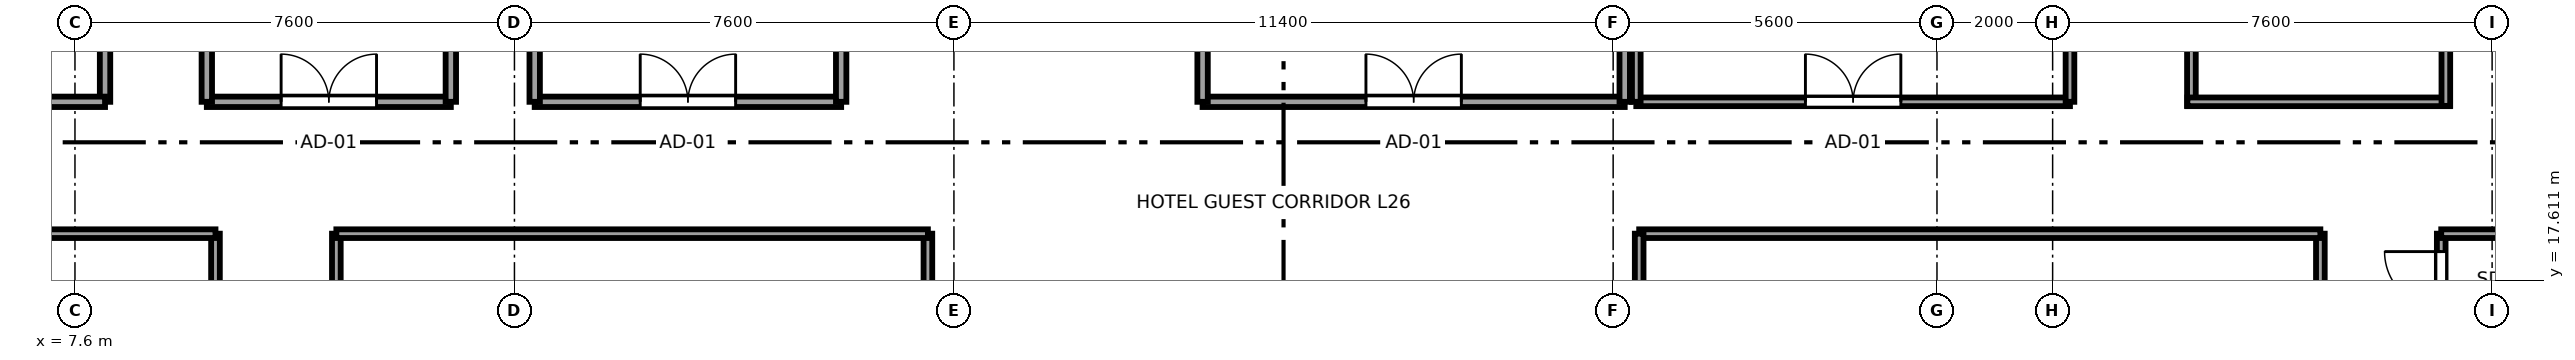
"""IFC4 building model, lengths in metres.
Left out: names, types, materials, properties, quantities, classifications, styles, units other than length and angle.
Written with IfcOpenShell. Run it as: python <this file> out.ifc"""

import sys

from ifc_helpers import new_model, si_unit, direction, frame, frame_2d, origin, place, context, subcontext, project, spatial, rectangle, extrude, source, transform, mapped, element, fill, save


model = new_model("IFC4")
c1 = context("Model", 3, precision=1e-05, world=origin(), true_north=direction((0.0, 1.0)))
c2 = subcontext(c1, "Body", "Model", "MODEL_VIEW")
j1 = project(units=[si_unit("LENGTHUNIT", "METRE"), si_unit("PLANEANGLEUNIT", "RADIAN")], contexts=[c1])
p1 = place(None, origin())
s1 = spatial("IfcSite", under=j1, at=p1, CompositionType="ELEMENT")
p2 = place(p1, origin())
s2 = spatial("IfcBuilding", under=s1, at=p2, CompositionType="ELEMENT")
p3 = place(p2, frame((0.0, 0.0, 104.45)))
s3 = spatial("IfcBuildingStorey", under=s2, at=p3, CompositionType="ELEMENT", Elevation=104.45)
p4 = place(p3, frame((10.03, 11.61, 0.0), z_axis=(0.0, 0.0, 1.0), x_axis=(0.0, 1.0, 0.0)))
e1 = element("IfcWall", 1, at=p4, inside=s3, PredefinedType="PARTITIONING", context=c2, shape_type="SweptSolid", body=[
    extrude(rectangle(XDim=6.81, YDim=0.15, at=frame_2d((3.405, 0.0))), origin(), (0.0, 0.0, 1.0), 3.37),
])
p5 = place(p4, frame((2.895, 0.0, 0.0)))
e2 = element("IfcOpeningElement", 2, at=p5, cuts=e1, PredefinedType="OPENING", context=c2, shape_type="SweptSolid", body=[
    extrude(rectangle(XDim=0.98, YDim=2.12, at=frame_2d((0.49, 1.06))), frame((0.0, 0.085, 0.0), z_axis=(0.0, -1.0, 0.0), x_axis=(1.0, 0.0, 0.0)), (0.0, 0.0, 1.0), 0.17),
])
p6 = place(p3, frame((0.3, 18.42, 0.0), z_axis=(0.0, 0.0, 1.0), x_axis=(1.0, 0.0, 0.0)))
e3 = element("IfcWall", 3, at=p6, inside=s3, PredefinedType="PARTITIONING", context=c2, shape_type="SweptSolid", body=[
    extrude(rectangle(XDim=9.73, YDim=0.15, at=frame_2d((4.865, 0.0))), origin(), (0.0, 0.0, 1.0), 3.37),
])
p7 = place(p3, frame((12.12, 14.81, 0.0), z_axis=(0.0, 0.0, 1.0), x_axis=(0.0, 1.0, 0.0)))
e4 = element("IfcWall", 4, at=p7, inside=s3, PredefinedType="PARTITIONING", context=c2, shape_type="SweptSolid", body=[
    extrude(rectangle(XDim=3.61, YDim=0.15, at=frame_2d((1.805, 0.0))), origin(), (0.0, 0.0, 1.0), 3.37),
])
p8 = place(p7, frame((1.295, 0.0, 0.0)))
e5 = element("IfcOpeningElement", 5, at=p8, cuts=e4, PredefinedType="OPENING", context=c2, shape_type="SweptSolid", body=[
    extrude(rectangle(XDim=0.98, YDim=2.12, at=frame_2d((0.49, 1.06))), frame((0.0, 0.085, 0.0), z_axis=(0.0, -1.0, 0.0), x_axis=(1.0, 0.0, 0.0)), (0.0, 0.0, 1.0), 0.17),
])
p9 = place(p3, frame((22.35, 12.48, 0.0), z_axis=(0.0, 0.0, 1.0), x_axis=(0.0, 1.0, 0.0)))
e6 = element("IfcWall", 6, at=p9, inside=s3, PredefinedType="PARTITIONING", context=c2, shape_type="SweptSolid", body=[
    extrude(rectangle(XDim=5.94, YDim=0.15, at=frame_2d((2.97, 0.0))), origin(), (0.0, 0.0, 1.0), 3.37),
])
p10 = place(p3, frame((12.12, 18.42, 0.0), z_axis=(0.0, 0.0, 1.0), x_axis=(1.0, 0.0, 0.0)))
e7 = element("IfcWall", 7, at=p10, inside=s3, PredefinedType="PARTITIONING", context=c2, shape_type="SweptSolid", body=[
    extrude(rectangle(XDim=10.23, YDim=0.15, at=frame_2d((5.115, 0.0))), origin(), (0.0, 0.0, 1.0), 3.37),
])
p11 = place(p3, frame((46.43, 11.41, 0.0), z_axis=(0.0, 0.0, 1.0), x_axis=(0.0, 1.0, 0.0)))
e8 = element("IfcWall", 8, at=p11, inside=s3, PredefinedType="PARTITIONING", context=c2, shape_type="SweptSolid", body=[
    extrude(rectangle(XDim=7.01, YDim=0.15, at=frame_2d((3.505, 0.0))), origin(), (0.0, 0.0, 1.0), 3.37),
])
p12 = place(p11, frame((2.995, 0.0, 0.0)))
e9 = element("IfcOpeningElement", 9, at=p12, cuts=e8, PredefinedType="OPENING", context=c2, shape_type="SweptSolid", body=[
    extrude(rectangle(XDim=0.98, YDim=2.12, at=frame_2d((0.49, 1.06))), frame((0.0, 0.085, 0.0), z_axis=(0.0, -1.0, 0.0), x_axis=(1.0, 0.0, 0.0)), (0.0, 0.0, 1.0), 0.17),
])
p13 = place(p3, frame((34.65, 18.42, 0.0), z_axis=(0.0, 0.0, 1.0), x_axis=(1.0, 0.0, 0.0)))
e10 = element("IfcWall", 10, at=p13, inside=s3, PredefinedType="PARTITIONING", context=c2, shape_type="SweptSolid", body=[
    extrude(rectangle(XDim=11.78, YDim=0.15, at=frame_2d((5.89, 0.0))), origin(), (0.0, 0.0, 1.0), 3.37),
])
p14 = place(p3, frame((34.65, 9.08, 0.0), z_axis=(0.0, 0.0, 1.0), x_axis=(0.0, 1.0, 0.0)))
e11 = element("IfcWall", 11, at=p14, inside=s3, PredefinedType="PARTITIONING", context=c2, shape_type="SweptSolid", body=[
    extrude(rectangle(XDim=9.34, YDim=0.15, at=frame_2d((4.67, 0.0))), origin(), (0.0, 0.0, 1.0), 3.37),
])
p15 = place(p3, frame((48.52, 14.61, 0.0), z_axis=(0.0, 0.0, 1.0), x_axis=(0.0, 1.0, 0.0)))
e12 = element("IfcWall", 12, at=p15, inside=s3, PredefinedType="PARTITIONING", context=c2, shape_type="SweptSolid", body=[
    extrude(rectangle(XDim=3.81, YDim=0.15, at=frame_2d((1.905, 0.0))), origin(), (0.0, 0.0, 1.0), 3.37),
])
p16 = place(p15, frame((2.52, 0.0, 0.0)))
e13 = element("IfcOpeningElement", 13, at=p16, cuts=e12, PredefinedType="OPENING", context=c2, shape_type="SweptSolid", body=[
    extrude(rectangle(XDim=0.98, YDim=2.12, at=frame_2d((0.49, 1.06))), frame((0.0, 0.085, 0.0), z_axis=(0.0, -1.0, 0.0), x_axis=(1.0, 0.0, 0.0)), (0.0, 0.0, 1.0), 0.17),
])
p17 = place(p3, frame((48.52, 18.42, 0.0), z_axis=(0.0, 0.0, 1.0), x_axis=(1.0, 0.0, 0.0)))
e14 = element("IfcWall", 14, at=p17, inside=s3, PredefinedType="PARTITIONING", context=c2, shape_type="SweptSolid", body=[
    extrude(rectangle(XDim=8.075, YDim=0.15, at=frame_2d((4.038, 0.0))), origin(), (0.0, 0.0, 1.0), 3.37),
])
p18 = place(p3, frame((8.12, 20.7, 0.0), z_axis=(0.0, 0.0, 1.0), x_axis=(0.0, 1.0, 0.0)))
e15 = element("IfcWall", 15, at=p18, inside=s3, PredefinedType="PARTITIONING", context=c2, shape_type="SweptSolid", body=[
    extrude(rectangle(XDim=15.1, YDim=0.18, at=frame_2d((7.55, 0.0))), origin(), (0.0, 0.0, 1.0), 3.37),
])
p19 = place(p18, frame((5.15, 0.0, 0.0)))
e16 = element("IfcOpeningElement", 16, at=p19, cuts=e15, PredefinedType="OPENING", context=c2, shape_type="SweptSolid", body=[
    extrude(rectangle(XDim=1.65, YDim=2.15, at=frame_2d((0.825, 1.075))), frame((0.0, 0.1, 0.0), z_axis=(0.0, -1.0, 0.0), x_axis=(1.0, 0.0, 0.0)), (0.0, 0.0, 1.0), 0.2),
])
p20 = place(p3, frame((0.3, 20.7, 0.0), z_axis=(0.0, 0.0, 1.0), x_axis=(1.0, 0.0, 0.0)))
e17 = element("IfcWall", 17, at=p20, inside=s3, PredefinedType="PARTITIONING", context=c2, shape_type="SweptSolid", body=[
    extrude(rectangle(XDim=7.82, YDim=0.18, at=frame_2d((3.91, 0.0))), origin(), (0.0, 0.0, 1.0), 3.37),
])
p21 = place(p3, frame((44.2, 20.63, 0.0), z_axis=(0.0, 0.0, 1.0), x_axis=(0.0, 1.0, 0.0)))
e18 = element("IfcWall", 18, at=p21, inside=s3, PredefinedType="PARTITIONING", context=c2, shape_type="SweptSolid", body=[
    extrude(rectangle(XDim=3.74, YDim=0.15, at=frame_2d((1.87, 0.0))), origin(), (0.0, 0.0, 1.0), 3.37),
])
p22 = place(p21, frame((1.24, 0.0, 0.0)))
e19 = element("IfcOpeningElement", 19, at=p22, cuts=e18, PredefinedType="OPENING", context=c2, shape_type="SweptSolid", body=[
    extrude(rectangle(XDim=0.92, YDim=2.01, at=frame_2d((0.46, 1.005))), frame((0.0, 0.085, 0.0), z_axis=(0.0, -1.0, 0.0), x_axis=(1.0, 0.0, 0.0)), (0.0, 0.0, 1.0), 0.17),
])
p23 = place(p3, frame((44.13, 20.7, 0.0), z_axis=(0.0, 0.0, 1.0), x_axis=(1.0, 0.0, 0.0)))
e20 = element("IfcWall", 20, at=p23, inside=s3, PredefinedType="PARTITIONING", context=c2, shape_type="SweptSolid", body=[
    extrude(rectangle(XDim=4.54, YDim=0.15, at=frame_2d((2.27, 0.0))), origin(), (0.0, 0.0, 1.0), 3.37),
])
p24 = place(p3, frame((48.6, 20.63, 0.0), z_axis=(0.0, 0.0, 1.0), x_axis=(0.0, 1.0, 0.0)))
e21 = element("IfcWall", 21, at=p24, inside=s3, PredefinedType="PARTITIONING", context=c2, shape_type="SweptSolid", body=[
    extrude(rectangle(XDim=3.74, YDim=0.15, at=frame_2d((1.87, 0.0))), origin(), (0.0, 0.0, 1.0), 3.37),
])
p25 = place(p3, frame((9.88, 20.7, 0.0), z_axis=(0.0, 0.0, 1.0), x_axis=(1.0, 0.0, 0.0)))
e22 = element("IfcWall", 22, at=p25, inside=s3, PredefinedType="PARTITIONING", context=c2, shape_type="SweptSolid", body=[
    extrude(rectangle(XDim=4.22, YDim=0.18, at=frame_2d((2.11, 0.0))), origin(), (0.0, 0.0, 1.0), 3.37),
])
p26 = place(p25, frame((1.285, 0.0, 0.0)))
e23 = element("IfcOpeningElement", 23, at=p26, cuts=e22, PredefinedType="OPENING", context=c2, shape_type="SweptSolid", body=[
    extrude(rectangle(XDim=1.65, YDim=2.15, at=frame_2d((0.825, 1.075))), frame((0.0, 0.1, 0.0), z_axis=(0.0, -1.0, 0.0), x_axis=(1.0, 0.0, 0.0)), (0.0, 0.0, 1.0), 0.2),
])
for number, where, z_axis, x_axis in (
    (24, (9.88, 20.7, 0.0), (0.0, 0.0, 1.0), (0.0, 1.0, 0.0)),
    (25, (14.1, 20.7, 0.0), (0.0, 0.0, 1.0), (0.0, 1.0, 0.0)),
):
    element("IfcWall", number, at=place(p3, frame(where, z_axis=z_axis, x_axis=x_axis)), inside=s3, PredefinedType="PARTITIONING", context=c2, shape_type="SweptSolid", body=[
        extrude(rectangle(XDim=9.05, YDim=0.18, at=frame_2d((4.525, 0.0))), origin(), (0.0, 0.0, 1.0), 3.37),
    ])
p27 = place(p3, frame((27.1, 20.7, 0.0), z_axis=(0.0, 0.0, 1.0), x_axis=(1.0, 0.0, 0.0)))
e26 = element("IfcWall", 26, at=p27, inside=s3, PredefinedType="PARTITIONING", context=c2, shape_type="SweptSolid", body=[
    extrude(rectangle(XDim=7.3, YDim=0.18, at=frame_2d((3.65, 0.0))), origin(), (0.0, 0.0, 1.0), 3.37),
])
p28 = place(p27, frame((2.825, 0.0, 0.0)))
e27 = element("IfcOpeningElement", 27, at=p28, cuts=e26, PredefinedType="OPENING", context=c2, shape_type="SweptSolid", body=[
    extrude(rectangle(XDim=1.65, YDim=2.15, at=frame_2d((0.825, 1.075))), frame((0.0, 0.1, 0.0), z_axis=(0.0, -1.0, 0.0), x_axis=(1.0, 0.0, 0.0)), (0.0, 0.0, 1.0), 0.2),
])
for number, where, z_axis, x_axis in (
    (28, (27.1, 20.7, 0.0), (0.0, 0.0, 1.0), (0.0, 1.0, 0.0)),
    (29, (34.4, 20.7, 0.0), (0.0, 0.0, 1.0), (0.0, 1.0, 0.0)),
):
    element("IfcWall", number, at=place(p3, frame(where, z_axis=z_axis, x_axis=x_axis)), inside=s3, PredefinedType="PARTITIONING", context=c2, shape_type="SweptSolid", body=[
        extrude(rectangle(XDim=9.1, YDim=0.18, at=frame_2d((4.55, 0.0))), origin(), (0.0, 0.0, 1.0), 3.37),
    ])
p29 = place(p3, frame((15.55, 20.7, 0.0), z_axis=(0.0, 0.0, 1.0), x_axis=(1.0, 0.0, 0.0)))
e30 = element("IfcWall", 30, at=p29, inside=s3, PredefinedType="PARTITIONING", context=c2, shape_type="SweptSolid", body=[
    extrude(rectangle(XDim=5.3, YDim=0.18, at=frame_2d((2.65, 0.0))), origin(), (0.0, 0.0, 1.0), 3.37),
])
p30 = place(p29, frame((1.825, 0.0, 0.0)))
e31 = element("IfcOpeningElement", 31, at=p30, cuts=e30, PredefinedType="OPENING", context=c2, shape_type="SweptSolid", body=[
    extrude(rectangle(XDim=1.65, YDim=2.15, at=frame_2d((0.825, 1.075))), frame((0.0, 0.1, 0.0), z_axis=(0.0, -1.0, 0.0), x_axis=(1.0, 0.0, 0.0)), (0.0, 0.0, 1.0), 0.2),
])
for number, where, z_axis, x_axis in (
    (32, (15.55, 20.7, 0.0), (0.0, 0.0, 1.0), (0.0, 1.0, 0.0)),
    (33, (20.85, 20.7, 0.0), (0.0, 0.0, 1.0), (0.0, 1.0, 0.0)),
):
    element("IfcWall", number, at=place(p3, frame(where, z_axis=z_axis, x_axis=x_axis)), inside=s3, PredefinedType="PARTITIONING", context=c2, shape_type="SweptSolid", body=[
        extrude(rectangle(XDim=9.1, YDim=0.18, at=frame_2d((4.55, 0.0))), origin(), (0.0, 0.0, 1.0), 3.37),
    ])
p31 = place(p3, frame((34.6, 20.7, 0.0), z_axis=(0.0, 0.0, 1.0), x_axis=(1.0, 0.0, 0.0)))
e34 = element("IfcWall", 34, at=p31, inside=s3, PredefinedType="PARTITIONING", context=c2, shape_type="SweptSolid", body=[
    extrude(rectangle(XDim=7.5, YDim=0.15, at=frame_2d((3.75, 0.0))), origin(), (0.0, 0.0, 1.0), 3.37),
])
p32 = place(p31, frame((2.925, 0.0, 0.0)))
e35 = element("IfcOpeningElement", 35, at=p32, cuts=e34, PredefinedType="OPENING", context=c2, shape_type="SweptSolid", body=[
    extrude(rectangle(XDim=1.65, YDim=2.15, at=frame_2d((0.825, 1.075))), frame((0.0, 0.085, 0.0), z_axis=(0.0, -1.0, 0.0), x_axis=(1.0, 0.0, 0.0)), (0.0, 0.0, 1.0), 0.17),
])
p33 = place(p3, frame((34.6, 20.7, 0.0), z_axis=(0.0, 0.0, 1.0), x_axis=(0.0, 1.0, 0.0)))
e36 = element("IfcWall", 36, at=p33, inside=s3, PredefinedType="PARTITIONING", context=c2, shape_type="SweptSolid", body=[
    extrude(rectangle(XDim=8.7, YDim=0.15, at=frame_2d((4.35, 0.0))), origin(), (0.0, 0.0, 1.0), 3.37),
])
p34 = place(p3, frame((42.1, 20.7, 0.0), z_axis=(0.0, 0.0, 1.0), x_axis=(0.0, 1.0, 0.0)))
e37 = element("IfcWall", 37, at=p34, inside=s3, PredefinedType="PARTITIONING", context=c2, shape_type="SweptSolid", body=[
    extrude(rectangle(XDim=8.7, YDim=0.15, at=frame_2d((4.35, 0.0))), origin(), (0.0, 0.0, 1.0), 2.16),
])
m1 = source(origin(), c2, "Body", "SweptSolid", [
    extrude(rectangle(XDim=0.98, YDim=2.12, at=frame_2d((0.49, 1.06))), frame((0.0, 0.025, 0.0), z_axis=(0.0, -1.0, 0.0), x_axis=(1.0, 0.0, 0.0)), (0.0, 0.0, 1.0), 0.05),
])
p35 = place(p16, origin())
e38 = element("IfcDoor", 38, at=p35, inside=s3, OperationType="SINGLE_SWING_RIGHT", PredefinedType="DOOR", context=c2, shape_type="MappedRepresentation", body=[
    mapped(m1, transform((0.0, 0.0, 0.0), x_axis=(1.0, 0.0, 0.0), y_axis=(0.0, 1.0, 0.0), z_axis=(0.0, 0.0, 1.0), scale=1.0)),
])
fill(e13, e38)
m2 = source(origin(), c2, "Body", "SweptSolid", [
    extrude(rectangle(XDim=1.65, YDim=2.15, at=frame_2d((0.825, 1.075))), frame((0.0, 0.025, 0.0), z_axis=(0.0, -1.0, 0.0), x_axis=(1.0, 0.0, 0.0)), (0.0, 0.0, 1.0), 0.05),
])
p36 = place(p26, origin())
e39 = element("IfcDoor", 39, at=p36, inside=s3, OperationType="DOUBLE_DOOR_SINGLE_SWING", PredefinedType="DOOR", context=c2, shape_type="MappedRepresentation", body=[
    mapped(m2, transform((0.0, 0.0, 0.0), x_axis=(1.0, 0.0, 0.0), y_axis=(0.0, 1.0, 0.0), z_axis=(0.0, 0.0, 1.0), scale=1.0)),
])
fill(e23, e39)
p37 = place(p28, origin())
e40 = element("IfcDoor", 40, at=p37, inside=s3, OperationType="DOUBLE_DOOR_SINGLE_SWING", PredefinedType="DOOR", context=c2, shape_type="MappedRepresentation", body=[
    mapped(m2, transform((0.0, 0.0, 0.0), x_axis=(1.0, 0.0, 0.0), y_axis=(0.0, 1.0, 0.0), z_axis=(0.0, 0.0, 1.0), scale=1.0)),
])
fill(e27, e40)
p38 = place(p30, origin())
e41 = element("IfcDoor", 41, at=p38, inside=s3, OperationType="DOUBLE_DOOR_SINGLE_SWING", PredefinedType="DOOR", context=c2, shape_type="MappedRepresentation", body=[
    mapped(m2, transform((0.0, 0.0, 0.0), x_axis=(1.0, 0.0, 0.0), y_axis=(0.0, 1.0, 0.0), z_axis=(0.0, 0.0, 1.0), scale=1.0)),
])
fill(e31, e41)
p39 = place(p32, origin())
e42 = element("IfcDoor", 42, at=p39, inside=s3, OperationType="DOUBLE_DOOR_SINGLE_SWING", PredefinedType="DOOR", context=c2, shape_type="MappedRepresentation", body=[
    mapped(m2, transform((0.0, 0.0, 0.0), x_axis=(1.0, 0.0, 0.0), y_axis=(0.0, 1.0, 0.0), z_axis=(0.0, 0.0, 1.0), scale=1.0)),
])
fill(e35, e42)
save(model, sys.argv[1])
